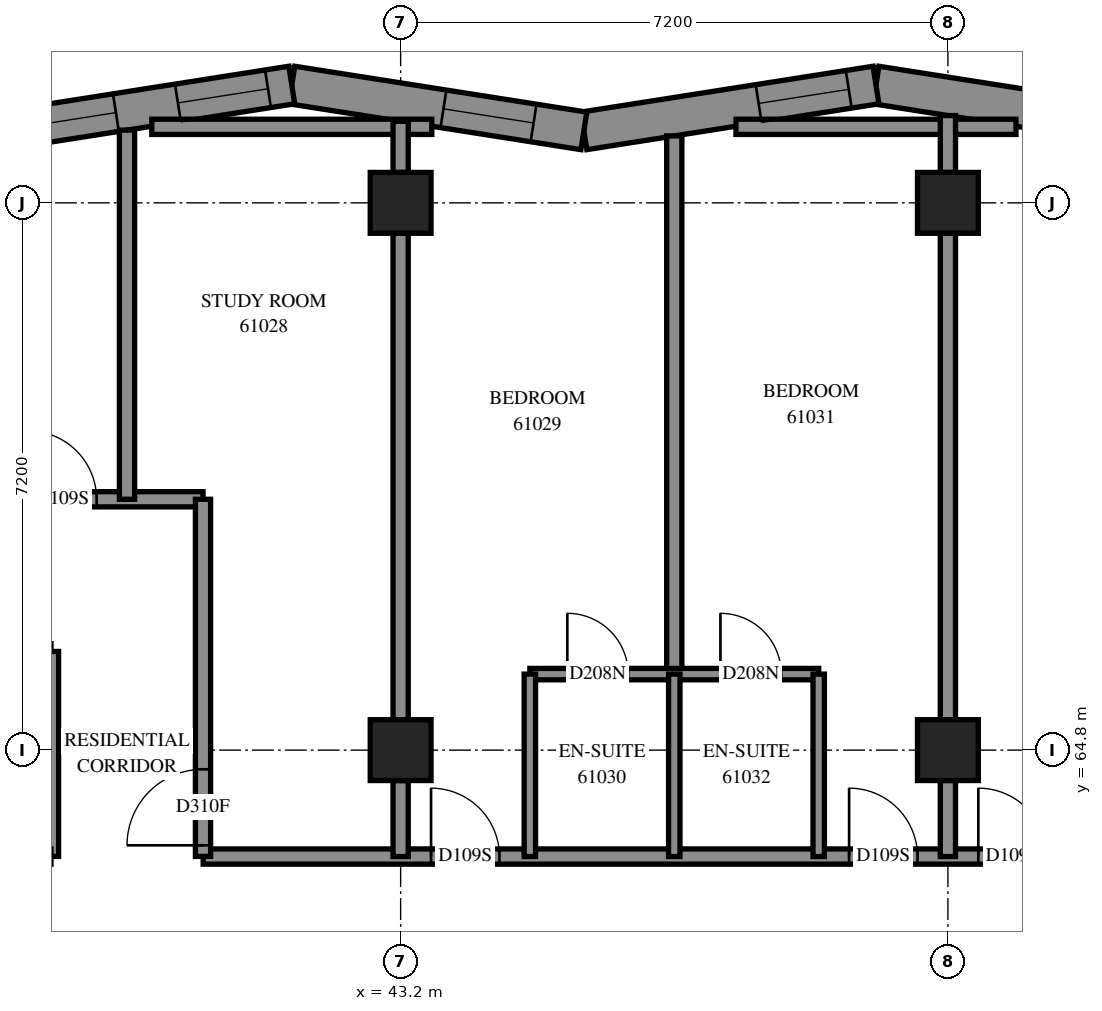
"""IFC4 building model, lengths in metres.
Left out: names, types, materials, properties, quantities, classifications, styles, units other than length and angle.
Written with IfcOpenShell. Run it as: python <this file> out.ifc"""

import sys

from ifc_helpers import new_model, si_unit, direction, frame, frame_2d, origin, origin_2d, place, context, subcontext, project, spatial, polyline, rectangle, outline, extrude, element, fill, save


model = new_model("IFC4")
c1 = context("Model", 3, precision=1e-05, world=origin(), true_north=direction((0.0, 1.0)))
c2 = subcontext(c1, "Body", "Model", "MODEL_VIEW")
j1 = project(units=[si_unit("LENGTHUNIT", "METRE"), si_unit("PLANEANGLEUNIT", "RADIAN")], contexts=[c1])
p1 = place(None, origin())
s1 = spatial("IfcSite", under=j1, at=p1, CompositionType="ELEMENT")
p2 = place(p1, origin())
s2 = spatial("IfcBuilding", under=s1, at=p2, CompositionType="ELEMENT")
p3 = place(p2, frame((0.0, 0.0, 223.6)))
s3 = spatial("IfcBuildingStorey", under=s2, at=p3, CompositionType="ELEMENT", Elevation=223.6)
for number, where, z_axis, x_axis in (
    (1, (43.2, 64.8, 0.0), (0.0, 0.0, 1.0), (1.0, 0.0, 0.0)),
    (2, (43.2, 72.0, 0.0), (0.0, 0.0, 1.0), (1.0, 0.0, 0.0)),
    (3, (50.4, 64.8, 0.0), (0.0, 0.0, 1.0), (1.0, 0.0, 0.0)),
    (4, (50.4, 72.0, 0.0), (0.0, 0.0, 1.0), (1.0, 0.0, 0.0)),
):
    element("IfcColumn", number, at=place(p3, frame(where, z_axis=z_axis, x_axis=x_axis)), inside=s3, PredefinedType="COLUMN", context=c2, shape_type="SweptSolid", body=[
        extrude(rectangle(XDim=0.8, YDim=0.8, at=origin_2d()), origin(), (0.0, 0.0, 1.0), 3.1),
    ])
p4 = place(p3, frame((53.296, 72.947, 0.0), z_axis=(0.0, 0.0, 1.0), x_axis=(-0.9879107269, 0.1550238552, 0.0)))
e5 = element("IfcWall", 5, at=p4, inside=s3, PredefinedType="SOLIDWALL", context=c2, shape_type="SweptSolid", body=[
    extrude(outline(polyline([(0.039, -0.25), (3.929, -0.25), (3.85, 0.25), (-0.039, 0.25), (0.039, -0.25)])), origin(), (0.0, 0.0, 1.0), 3.1),
])
p5 = place(p4, frame((0.666, 0.0, 0.45)))
e6 = element("IfcOpeningElement", 6, at=p5, cuts=e5, PredefinedType="OPENING", context=c2, shape_type="SweptSolid", body=[
    extrude(rectangle(XDim=1.2, YDim=2.5, at=frame_2d((0.6, 1.25))), frame((0.0, 0.26, 0.0), z_axis=(0.0, -1.0, 0.0), x_axis=(1.0, 0.0, 0.0)), (0.0, 0.0, 1.0), 0.52),
])
p6 = place(p3, frame((49.453, 73.55, 0.0), z_axis=(0.0, 0.0, 1.0), x_axis=(-0.9879113447, -0.155019918, 0.0)))
e7 = element("IfcWall", 7, at=p6, inside=s3, PredefinedType="SOLIDWALL", context=c2, shape_type="SweptSolid", body=[
    extrude(outline(polyline([(-0.039, -0.25), (3.85, -0.25), (3.929, 0.25), (0.039, 0.25), (-0.039, -0.25)])), origin(), (0.0, 0.0, 1.0), 3.1),
])
p7 = place(p6, frame((0.363, 0.0, 0.45)))
e8 = element("IfcOpeningElement", 8, at=p7, cuts=e7, PredefinedType="OPENING", context=c2, shape_type="SweptSolid", body=[
    extrude(rectangle(XDim=1.2, YDim=2.5, at=frame_2d((0.6, 1.25))), frame((0.0, 0.26, 0.0), z_axis=(0.0, -1.0, 0.0), x_axis=(1.0, 0.0, 0.0)), (0.0, 0.0, 1.0), 0.52),
])
p8 = place(p3, frame((45.611, 72.947, 0.0), z_axis=(0.0, 0.0, 1.0), x_axis=(-0.9879107269, 0.1550238552, 0.0)))
e9 = element("IfcWall", 9, at=p8, inside=s3, PredefinedType="SOLIDWALL", context=c2, shape_type="SweptSolid", body=[
    extrude(outline(polyline([(0.039, -0.25), (3.929, -0.25), (3.85, 0.25), (-0.039, 0.25), (0.039, -0.25)])), origin(), (0.0, 0.0, 1.0), 3.1),
])
p9 = place(p8, frame((0.67, 0.0, 0.45)))
e10 = element("IfcOpeningElement", 10, at=p9, cuts=e9, PredefinedType="OPENING", context=c2, shape_type="SweptSolid", body=[
    extrude(rectangle(XDim=1.2, YDim=2.5, at=frame_2d((0.6, 1.25))), frame((0.0, 0.26, 0.0), z_axis=(0.0, -1.0, 0.0), x_axis=(1.0, 0.0, 0.0)), (0.0, 0.0, 1.0), 0.52),
])
p10 = place(p3, frame((41.768, 73.55, 0.0), z_axis=(0.0, 0.0, 1.0), x_axis=(-0.9879113447, -0.155019918, 0.0)))
e11 = element("IfcWall", 11, at=p10, inside=s3, PredefinedType="SOLIDWALL", context=c2, shape_type="SweptSolid", body=[
    extrude(outline(polyline([(-0.039, -0.25), (3.85, -0.25), (3.929, 0.25), (0.039, 0.25), (-0.039, -0.25)])), origin(), (0.0, 0.0, 1.0), 3.1),
])
p11 = place(p10, frame((0.317, 0.0, 0.45)))
e12 = element("IfcOpeningElement", 12, at=p11, cuts=e11, PredefinedType="OPENING", context=c2, shape_type="SweptSolid", body=[
    extrude(rectangle(XDim=1.2, YDim=2.5, at=frame_2d((0.6, 1.25))), frame((0.0, 0.26, 0.0), z_axis=(0.0, -1.0, 0.0), x_axis=(1.0, 0.0, 0.0)), (0.0, 0.0, 1.0), 0.52),
])
p12 = place(p10, frame((2.342, 0.0, 0.45)))
e13 = element("IfcOpeningElement", 13, at=p12, cuts=e11, PredefinedType="OPENING", context=c2, shape_type="SweptSolid", body=[
    extrude(rectangle(XDim=1.2, YDim=2.5, at=frame_2d((0.6, 1.25))), frame((0.0, 0.26, 0.0), z_axis=(0.0, -1.0, 0.0), x_axis=(1.0, 0.0, 0.0)), (0.0, 0.0, 1.0), 0.52),
])
p13 = place(p3, frame((40.602, 63.4, 0.0), z_axis=(0.0, 0.0, 1.0), x_axis=(1.0, 0.0, 0.0)))
e14 = element("IfcWall", 14, at=p13, inside=s3, PredefinedType="PARTITIONING", context=c2, shape_type="SweptSolid", body=[
    extrude(rectangle(XDim=14.398, YDim=0.2, at=frame_2d((7.199, 0.0))), origin(), (0.0, 0.0, 1.0), 3.1),
])
p14 = place(p13, frame((2.998, 0.0, 0.0)))
e15 = element("IfcOpeningElement", 15, at=p14, cuts=e14, PredefinedType="OPENING", context=c2, shape_type="SweptSolid", body=[
    extrude(rectangle(XDim=0.9, YDim=2.1, at=frame_2d((0.45, 1.05))), frame((0.0, 0.11, 0.0), z_axis=(0.0, -1.0, 0.0), x_axis=(1.0, 0.0, 0.0)), (0.0, 0.0, 1.0), 0.22),
])
p15 = place(p13, frame((8.498, 0.0, 0.0)))
e16 = element("IfcOpeningElement", 16, at=p15, cuts=e14, PredefinedType="OPENING", context=c2, shape_type="SweptSolid", body=[
    extrude(rectangle(XDim=0.9, YDim=2.1, at=frame_2d((0.45, 1.05))), frame((0.0, 0.11, 0.0), z_axis=(0.0, -1.0, 0.0), x_axis=(1.0, 0.0, 0.0)), (0.0, 0.0, 1.0), 0.22),
])
p16 = place(p13, frame((10.198, 0.0, 0.0)))
e17 = element("IfcOpeningElement", 17, at=p16, cuts=e14, PredefinedType="OPENING", context=c2, shape_type="SweptSolid", body=[
    extrude(rectangle(XDim=0.9, YDim=2.1, at=frame_2d((0.45, 1.05))), frame((0.0, 0.11, 0.0), z_axis=(0.0, -1.0, 0.0), x_axis=(1.0, 0.0, 0.0)), (0.0, 0.0, 1.0), 0.22),
])
p17 = place(p3, frame((28.8, 68.1, 0.0), z_axis=(0.0, 0.0, 1.0), x_axis=(1.0, 0.0, 0.0)))
e18 = element("IfcWall", 18, at=p17, inside=s3, PredefinedType="PARTITIONING", context=c2, shape_type="SweptSolid", body=[
    extrude(rectangle(XDim=11.8, YDim=0.2, at=frame_2d((5.9, 0.0))), origin(), (0.0, 0.0, 1.0), 3.1),
])
p18 = place(p17, frame((2.3, 0.0, 0.0)))
e19 = element("IfcOpeningElement", 19, at=p18, cuts=e18, PredefinedType="OPENING", context=c2, shape_type="SweptSolid", body=[
    extrude(rectangle(XDim=0.9, YDim=2.1, at=frame_2d((0.45, 1.05))), frame((0.0, 0.11, 0.0), z_axis=(0.0, -1.0, 0.0), x_axis=(1.0, 0.0, 0.0)), (0.0, 0.0, 1.0), 0.22),
])
p19 = place(p17, frame((4.0, 0.0, 0.0)))
e20 = element("IfcOpeningElement", 20, at=p19, cuts=e18, PredefinedType="OPENING", context=c2, shape_type="SweptSolid", body=[
    extrude(rectangle(XDim=0.9, YDim=2.1, at=frame_2d((0.45, 1.05))), frame((0.0, 0.11, 0.0), z_axis=(0.0, -1.0, 0.0), x_axis=(1.0, 0.0, 0.0)), (0.0, 0.0, 1.0), 0.22),
])
p20 = place(p17, frame((9.5, 0.0, 0.0)))
e21 = element("IfcOpeningElement", 21, at=p20, cuts=e18, PredefinedType="OPENING", context=c2, shape_type="SweptSolid", body=[
    extrude(rectangle(XDim=0.9, YDim=2.1, at=frame_2d((0.45, 1.05))), frame((0.0, 0.11, 0.0), z_axis=(0.0, -1.0, 0.0), x_axis=(1.0, 0.0, 0.0)), (0.0, 0.0, 1.0), 0.22),
])
p21 = place(p3, frame((46.8, 65.8, 0.0), z_axis=(0.0, 0.0, 1.0), x_axis=(0.0, 1.0, 0.0)))
e22 = element("IfcWall", 22, at=p21, inside=s3, PredefinedType="PARTITIONING", context=c2, shape_type="SweptSolid", body=[
    extrude(rectangle(XDim=7.08, YDim=0.2, at=frame_2d((3.54, 0.0))), origin(), (0.0, 0.0, 1.0), 3.1),
])
for number, where, z_axis, x_axis in (
    (23, (43.2, 65.2, 0.0), (0.0, 0.0, 1.0), (0.0, 1.0, 0.0)),
    (24, (50.4, 65.2, 0.0), (0.0, 0.0, 1.0), (0.0, 1.0, 0.0)),
):
    element("IfcWall", number, at=place(p3, frame(where, z_axis=z_axis, x_axis=x_axis)), inside=s3, PredefinedType="PARTITIONING", context=c2, shape_type="SweptSolid", body=[
        extrude(rectangle(XDim=6.4, YDim=0.2, at=frame_2d((3.2, 0.0))), origin(), (0.0, 0.0, 1.0), 3.1),
    ])
p22 = place(p3, frame((39.6, 68.1, 0.0), z_axis=(0.0, 0.0, 1.0), x_axis=(0.0, 1.0, 0.0)))
e25 = element("IfcWall", 25, at=p22, inside=s3, PredefinedType="PARTITIONING", context=c2, shape_type="SweptSolid", body=[
    extrude(rectangle(XDim=4.857, YDim=0.2, at=frame_2d((2.428, 0.0))), origin(), (0.0, 0.0, 1.0), 3.1),
])
p23 = place(p3, frame((40.6, 63.402, 0.0), z_axis=(0.0, 0.0, 1.0), x_axis=(0.0, 1.0, 0.0)))
e26 = element("IfcWall", 26, at=p23, inside=s3, PredefinedType="PARTITIONING", context=c2, shape_type="SweptSolid", body=[
    extrude(rectangle(XDim=4.698, YDim=0.2, at=frame_2d((2.349, 0.0))), origin(), (0.0, 0.0, 1.0), 3.1),
])
p24 = place(p23, frame((0.146, 0.0, 0.0)))
e27 = element("IfcOpeningElement", 27, at=p24, cuts=e26, PredefinedType="OPENING", context=c2, shape_type="SweptSolid", body=[
    extrude(rectangle(XDim=1.0, YDim=2.1, at=frame_2d((0.5, 1.05))), frame((0.0, 0.11, 0.0), z_axis=(0.0, -1.0, 0.0), x_axis=(1.0, 0.0, 0.0)), (0.0, 0.0, 1.0), 0.22),
])
p25 = place(p3, frame((44.9, 65.8, 0.0), z_axis=(0.0, 0.0, 1.0), x_axis=(1.0, 0.0, 0.0)))
e28 = element("IfcWall", 28, at=p25, inside=s3, PredefinedType="PARTITIONING", context=c2, shape_type="SweptSolid", body=[
    extrude(rectangle(XDim=3.8, YDim=0.15, at=frame_2d((1.9, 0.0))), origin(), (0.0, 0.0, 1.0), 3.1),
])
p26 = place(p25, frame((0.493, 0.0, 0.0)))
e29 = element("IfcOpeningElement", 29, at=p26, cuts=e28, PredefinedType="OPENING", context=c2, shape_type="SweptSolid", body=[
    extrude(rectangle(XDim=0.8, YDim=2.1, at=frame_2d((0.4, 1.05))), frame((0.0, 0.085, 0.0), z_axis=(0.0, -1.0, 0.0), x_axis=(1.0, 0.0, 0.0)), (0.0, 0.0, 1.0), 0.17),
])
p27 = place(p25, frame((2.507, 0.0, 0.0)))
e30 = element("IfcOpeningElement", 30, at=p27, cuts=e28, PredefinedType="OPENING", context=c2, shape_type="SweptSolid", body=[
    extrude(rectangle(XDim=0.8, YDim=2.1, at=frame_2d((0.4, 1.05))), frame((0.0, 0.085, 0.0), z_axis=(0.0, -1.0, 0.0), x_axis=(1.0, 0.0, 0.0)), (0.0, 0.0, 1.0), 0.17),
])
for number, where, z_axis, x_axis in (
    (31, (39.926, 73.0, 0.0), (0.0, 0.0, 1.0), (1.0, 0.0, 0.0)),
    (32, (47.611, 73.0, 0.0), (0.0, 0.0, 1.0), (1.0, 0.0, 0.0)),
):
    element("IfcWall", number, at=place(p3, frame(where, z_axis=z_axis, x_axis=x_axis)), inside=s3, PredefinedType="PARTITIONING", context=c2, shape_type="SweptSolid", body=[
        extrude(rectangle(XDim=3.684, YDim=0.2, at=frame_2d((1.842, 0.0))), origin(), (0.0, 0.0, 1.0), 3.1),
    ])
p28 = place(p3, frame((38.6, 63.402, 0.0), z_axis=(0.0, 0.0, 1.0), x_axis=(0.0, 1.0, 0.0)))
e33 = element("IfcWall", 33, at=p28, inside=s3, PredefinedType="PARTITIONING", context=c2, shape_type="SweptSolid", body=[
    extrude(rectangle(XDim=2.696, YDim=0.2, at=frame_2d((1.348, 0.0))), origin(), (0.0, 0.0, 1.0), 3.1),
])
for number, where, z_axis, x_axis in (
    (34, (44.9, 63.4, 0.0), (0.0, 0.0, 1.0), (0.0, 1.0, 0.0)),
    (35, (46.8, 63.4, 0.0), (0.0, 0.0, 1.0), (0.0, 1.0, 0.0)),
    (36, (48.7, 63.4, 0.0), (0.0, 0.0, 1.0), (0.0, 1.0, 0.0)),
):
    element("IfcWall", number, at=place(p3, frame(where, z_axis=z_axis, x_axis=x_axis)), inside=s3, PredefinedType="PARTITIONING", context=c2, shape_type="SweptSolid", body=[
        extrude(rectangle(XDim=2.4, YDim=0.15, at=frame_2d((1.2, 0.0))), origin(), (0.0, 0.0, 1.0), 3.1),
    ])
for number, where, z_axis, x_axis in (
    (37, (43.2, 63.4, 0.0), (0.0, 0.0, 1.0), (0.0, 1.0, 0.0)),
    (38, (50.4, 63.4, 0.0), (0.0, 0.0, 1.0), (0.0, 1.0, 0.0)),
):
    element("IfcWall", number, at=place(p3, frame(where, z_axis=z_axis, x_axis=x_axis)), inside=s3, PredefinedType="PARTITIONING", context=c2, shape_type="SweptSolid", body=[
        extrude(rectangle(XDim=1.0, YDim=0.2, at=frame_2d((0.5, 0.0))), origin(), (0.0, 0.0, 1.0), 3.1),
    ])
p29 = place(p3, frame((50.4, 72.4, 0.0), z_axis=(0.0, 0.0, 1.0), x_axis=(0.0, 1.0, 0.0)))
e39 = element("IfcWall", 39, at=p29, inside=s3, PredefinedType="PARTITIONING", context=c2, shape_type="SweptSolid", body=[
    extrude(rectangle(XDim=0.748, YDim=0.2, at=frame_2d((0.374, 0.0))), origin(), (0.0, 0.0, 1.0), 3.1),
])
p30 = place(p3, frame((43.2, 72.4, 0.0), z_axis=(0.0, 0.0, 1.0), x_axis=(0.0, 1.0, 0.0)))
e40 = element("IfcWall", 40, at=p30, inside=s3, PredefinedType="PARTITIONING", context=c2, shape_type="SweptSolid", body=[
    extrude(rectangle(XDim=0.672, YDim=0.2, at=frame_2d((0.336, 0.0))), origin(), (0.0, 0.0, 1.0), 3.1),
])
p31 = place(p7, origin())
e41 = element("IfcWindow", 41, at=p31, inside=s3, PartitioningType="SINGLE_PANEL", PredefinedType="WINDOW", context=c2, shape_type="SweptSolid", body=[
    extrude(rectangle(XDim=1.2, YDim=2.5, at=frame_2d((0.6, 1.25))), frame((0.0, 0.18, 0.0), z_axis=(0.0, -1.0, 0.0), x_axis=(1.0, 0.0, 0.0)), (0.0, 0.0, 1.0), 0.06),
])
fill(e8, e41)
p32 = place(p9, origin())
e42 = element("IfcWindow", 42, at=p32, inside=s3, PartitioningType="SINGLE_PANEL", PredefinedType="WINDOW", context=c2, shape_type="SweptSolid", body=[
    extrude(rectangle(XDim=1.2, YDim=2.5, at=frame_2d((0.6, 1.25))), frame((0.0, 0.18, 0.0), z_axis=(0.0, -1.0, 0.0), x_axis=(1.0, 0.0, 0.0)), (0.0, 0.0, 1.0), 0.06),
])
fill(e10, e42)
p33 = place(p11, origin())
e43 = element("IfcWindow", 43, at=p33, inside=s3, PartitioningType="SINGLE_PANEL", PredefinedType="WINDOW", context=c2, shape_type="SweptSolid", body=[
    extrude(rectangle(XDim=1.2, YDim=2.5, at=frame_2d((0.6, 1.25))), frame((0.0, 0.18, 0.0), z_axis=(0.0, -1.0, 0.0), x_axis=(1.0, 0.0, 0.0)), (0.0, 0.0, 1.0), 0.06),
])
fill(e12, e43)
p34 = place(p12, origin())
e44 = element("IfcWindow", 44, at=p34, inside=s3, PartitioningType="SINGLE_PANEL", PredefinedType="WINDOW", context=c2, shape_type="SweptSolid", body=[
    extrude(rectangle(XDim=1.2, YDim=2.5, at=frame_2d((0.6, 1.25))), frame((0.0, 0.18, 0.0), z_axis=(0.0, -1.0, 0.0), x_axis=(1.0, 0.0, 0.0)), (0.0, 0.0, 1.0), 0.06),
])
fill(e13, e44)
p35 = place(p20, origin())
e45 = element("IfcDoor", 45, at=p35, inside=s3, OperationType="SINGLE_SWING_RIGHT", PredefinedType="DOOR", context=c2, shape_type="SweptSolid", body=[
    extrude(rectangle(XDim=0.9, YDim=2.1, at=frame_2d((0.45, 1.05))), frame((0.0, 0.025, 0.0), z_axis=(0.0, -1.0, 0.0), x_axis=(1.0, 0.0, 0.0)), (0.0, 0.0, 1.0), 0.05),
])
fill(e21, e45)
p36 = place(p24, origin())
e46 = element("IfcDoor", 46, at=p36, inside=s3, OperationType="SINGLE_SWING_LEFT", PredefinedType="DOOR", context=c2, shape_type="SweptSolid", body=[
    extrude(rectangle(XDim=1.0, YDim=2.1, at=frame_2d((0.5, 1.05))), frame((0.0, 0.025, 0.0), z_axis=(0.0, -1.0, 0.0), x_axis=(1.0, 0.0, 0.0)), (0.0, 0.0, 1.0), 0.05),
])
fill(e27, e46)
p37 = place(p14, origin())
e47 = element("IfcDoor", 47, at=p37, inside=s3, OperationType="SINGLE_SWING_RIGHT", PredefinedType="DOOR", context=c2, shape_type="SweptSolid", body=[
    extrude(rectangle(XDim=0.9, YDim=2.1, at=frame_2d((0.45, 1.05))), frame((0.0, 0.025, 0.0), z_axis=(0.0, -1.0, 0.0), x_axis=(1.0, 0.0, 0.0)), (0.0, 0.0, 1.0), 0.05),
])
fill(e15, e47)
p38 = place(p26, origin())
e48 = element("IfcDoor", 48, at=p38, inside=s3, OperationType="SINGLE_SWING_RIGHT", PredefinedType="DOOR", context=c2, shape_type="SweptSolid", body=[
    extrude(rectangle(XDim=0.8, YDim=2.1, at=frame_2d((0.4, 1.05))), frame((0.0, 0.025, 0.0), z_axis=(0.0, -1.0, 0.0), x_axis=(1.0, 0.0, 0.0)), (0.0, 0.0, 1.0), 0.05),
])
fill(e29, e48)
p39 = place(p15, origin())
e49 = element("IfcDoor", 49, at=p39, inside=s3, OperationType="SINGLE_SWING_LEFT", PredefinedType="DOOR", context=c2, shape_type="SweptSolid", body=[
    extrude(rectangle(XDim=0.9, YDim=2.1, at=frame_2d((0.45, 1.05))), frame((0.0, 0.025, 0.0), z_axis=(0.0, -1.0, 0.0), x_axis=(1.0, 0.0, 0.0)), (0.0, 0.0, 1.0), 0.05),
])
fill(e16, e49)
p40 = place(p27, origin())
e50 = element("IfcDoor", 50, at=p40, inside=s3, OperationType="SINGLE_SWING_RIGHT", PredefinedType="DOOR", context=c2, shape_type="SweptSolid", body=[
    extrude(rectangle(XDim=0.8, YDim=2.1, at=frame_2d((0.4, 1.05))), frame((0.0, 0.025, 0.0), z_axis=(0.0, -1.0, 0.0), x_axis=(1.0, 0.0, 0.0)), (0.0, 0.0, 1.0), 0.05),
])
fill(e30, e50)
p41 = place(p16, origin())
e51 = element("IfcDoor", 51, at=p41, inside=s3, OperationType="SINGLE_SWING_RIGHT", PredefinedType="DOOR", context=c2, shape_type="SweptSolid", body=[
    extrude(rectangle(XDim=0.9, YDim=2.1, at=frame_2d((0.45, 1.05))), frame((0.0, 0.025, 0.0), z_axis=(0.0, -1.0, 0.0), x_axis=(1.0, 0.0, 0.0)), (0.0, 0.0, 1.0), 0.05),
])
fill(e17, e51)
save(model, sys.argv[1])
